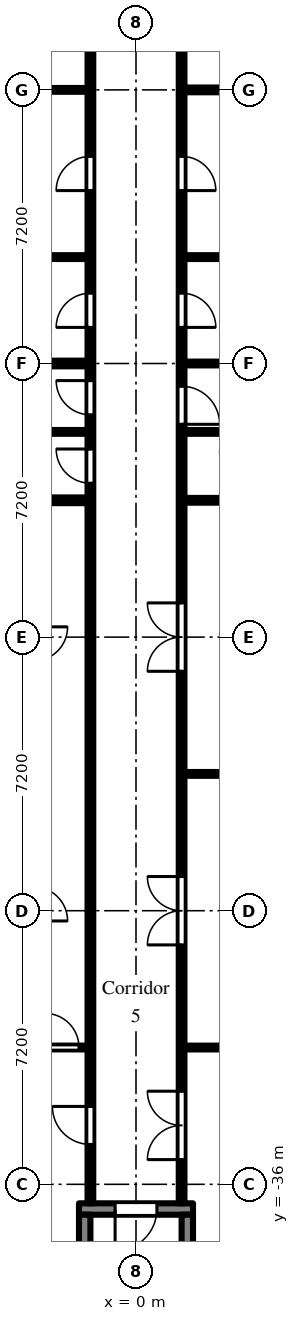
"""IFC4 building model, lengths in metres.
Left out: names, types, materials, properties, quantities, classifications, styles, units other than length and angle.
Written with IfcOpenShell. Run it as: python <this file> out.ifc"""

import sys

from ifc_helpers import new_model, si_unit, direction, frame, frame_2d, origin, place, context, subcontext, project, spatial, rectangle, extrude, element, fill, save


model = new_model("IFC4")
c1 = context("Model", 3, precision=1e-05, world=origin(), true_north=direction((0.0, 1.0)))
c2 = subcontext(c1, "Body", "Model", "MODEL_VIEW")
j1 = project(units=[si_unit("LENGTHUNIT", "METRE"), si_unit("PLANEANGLEUNIT", "RADIAN")], contexts=[c1])
p1 = place(None, origin())
s1 = spatial("IfcSite", under=j1, at=p1, CompositionType="ELEMENT")
p2 = place(p1, origin())
s2 = spatial("IfcBuilding", under=s1, at=p2, CompositionType="ELEMENT")
p3 = place(p2, frame((0.0, 0.0, 75.9)))
s3 = spatial("IfcBuildingStorey", under=s2, at=p3, CompositionType="ELEMENT", Elevation=75.9)
p4 = place(p3, frame((-1.5, -36.65, 0.0), z_axis=(0.0, 0.0, 1.0), x_axis=(1.0, 0.0, 0.0)))
e1 = element("IfcWall", 1, at=p4, inside=s3, PredefinedType="SHEAR", context=c2, shape_type="SweptSolid", body=[
    extrude(rectangle(XDim=3.0, YDim=0.3, at=frame_2d((1.5, 0.0))), origin(), (0.0, 0.0, 1.0), 2.575),
])
p5 = place(p4, frame((0.95, 0.0, 0.0)))
e2 = element("IfcOpeningElement", 2, at=p5, cuts=e1, PredefinedType="OPENING", context=c2, shape_type="SweptSolid", body=[
    extrude(rectangle(XDim=1.1, YDim=2.1, at=frame_2d((0.55, 1.05))), frame((0.0, 0.16, 0.0), z_axis=(0.0, -1.0, 0.0), x_axis=(1.0, 0.0, 0.0)), (0.0, 0.0, 1.0), 0.32),
])
for number, where, z_axis, x_axis in (
    (3, (-1.35, -36.8, 0.0), (0.0, 0.0, 1.0), (0.0, -1.0, 0.0)),
    (4, (1.35, -36.8, 0.0), (0.0, 0.0, 1.0), (0.0, -1.0, 0.0)),
):
    element("IfcWall", number, at=place(p3, frame(where, z_axis=z_axis, x_axis=x_axis)), inside=s3, PredefinedType="SHEAR", context=c2, shape_type="SweptSolid", body=[
        extrude(rectangle(XDim=5.8, YDim=0.3, at=frame_2d((2.9, 0.0))), origin(), (0.0, 0.0, 1.0), 2.575),
    ])
p6 = place(p3, frame((-6.9, -32.4, 0.0), z_axis=(0.0, 0.0, 1.0), x_axis=(1.0, 0.0, 0.0)))
e5 = element("IfcWall", 5, at=p6, inside=s3, PredefinedType="PARTITIONING", context=c2, shape_type="SweptSolid", body=[
    extrude(rectangle(XDim=5.625, YDim=0.1, at=frame_2d((2.812, 0.0))), origin(), (0.0, 0.0, 1.0), 2.575),
])
p7 = place(p6, frame((4.5, 0.0, 0.0)))
e6 = element("IfcOpeningElement", 6, at=p7, cuts=e5, PredefinedType="OPENING", context=c2, shape_type="SweptSolid", body=[
    extrude(rectangle(XDim=0.9, YDim=2.1, at=frame_2d((0.45, 1.05))), frame((0.0, 0.06, 0.0), z_axis=(0.0, -1.0, 0.0), x_axis=(1.0, 0.0, 0.0)), (0.0, 0.0, 1.0), 0.12),
])
p8 = place(p3, frame((-6.9, -18.0, 0.0), z_axis=(0.0, 0.0, 1.0), x_axis=(1.0, 0.0, 0.0)))
e7 = element("IfcWall", 7, at=p8, inside=s3, PredefinedType="PARTITIONING", context=c2, shape_type="SweptSolid", body=[
    extrude(rectangle(XDim=5.625, YDim=0.15, at=frame_2d((2.812, 0.0))), origin(), (0.0, 0.0, 1.0), 2.575),
])
p9 = place(p3, frame((-6.9, -16.2, 0.0), z_axis=(0.0, 0.0, 1.0), x_axis=(1.0, 0.0, 0.0)))
e8 = element("IfcWall", 8, at=p9, inside=s3, PredefinedType="PARTITIONING", context=c2, shape_type="SweptSolid", body=[
    extrude(rectangle(XDim=5.625, YDim=0.1, at=frame_2d((2.812, 0.0))), origin(), (0.0, 0.0, 1.0), 2.575),
])
p10 = place(p3, frame((-3.9, -14.4, 0.0), z_axis=(0.0, 0.0, 1.0), x_axis=(1.0, 0.0, 0.0)))
e9 = element("IfcWall", 9, at=p10, inside=s3, PredefinedType="PARTITIONING", context=c2, shape_type="SweptSolid", body=[
    extrude(rectangle(XDim=2.625, YDim=0.15, at=frame_2d((1.312, 0.0))), origin(), (0.0, 0.0, 1.0), 2.575),
])
for number, where, z_axis, x_axis in (
    (10, (-3.9, -11.6, 0.0), (0.0, 0.0, 1.0), (1.0, 0.0, 0.0)),
    (11, (-3.9, -7.2, 0.0), (0.0, 0.0, 1.0), (1.0, 0.0, 0.0)),
):
    element("IfcWall", number, at=place(p3, frame(where, z_axis=z_axis, x_axis=x_axis)), inside=s3, PredefinedType="PARTITIONING", context=c2, shape_type="SweptSolid", body=[
        extrude(rectangle(XDim=2.625, YDim=0.1, at=frame_2d((1.312, 0.0))), origin(), (0.0, 0.0, 1.0), 2.575),
    ])
p11 = place(p3, frame((-1.2, -36.5, 0.0), z_axis=(0.0, 0.0, 1.0), x_axis=(0.0, 1.0, 0.0)))
e12 = element("IfcWall", 12, at=p11, inside=s3, PredefinedType="PARTITIONING", context=c2, shape_type="SweptSolid", body=[
    extrude(rectangle(XDim=35.225, YDim=0.15, at=frame_2d((17.613, 0.0))), origin(), (0.0, 0.0, 1.0), 2.575),
])
p12 = place(p11, frame((23.05, 0.0, 0.0)))
e13 = element("IfcOpeningElement", 13, at=p12, cuts=e12, PredefinedType="OPENING", context=c2, shape_type="SweptSolid", body=[
    extrude(rectangle(XDim=0.9, YDim=2.1, at=frame_2d((0.45, 1.05))), frame((0.0, 0.085, 0.0), z_axis=(0.0, -1.0, 0.0), x_axis=(1.0, 0.0, 0.0)), (0.0, 0.0, 1.0), 0.17),
])
p13 = place(p11, frame((26.65, 0.0, 0.0)))
e14 = element("IfcOpeningElement", 14, at=p13, cuts=e12, PredefinedType="OPENING", context=c2, shape_type="SweptSolid", body=[
    extrude(rectangle(XDim=0.9, YDim=2.1, at=frame_2d((0.45, 1.05))), frame((0.0, 0.085, 0.0), z_axis=(0.0, -1.0, 0.0), x_axis=(1.0, 0.0, 0.0)), (0.0, 0.0, 1.0), 0.17),
])
p14 = place(p11, frame((20.75, 0.0, 0.0)))
e15 = element("IfcOpeningElement", 15, at=p14, cuts=e12, PredefinedType="OPENING", context=c2, shape_type="SweptSolid", body=[
    extrude(rectangle(XDim=0.9, YDim=2.1, at=frame_2d((0.45, 1.05))), frame((0.0, 0.085, 0.0), z_axis=(0.0, -1.0, 0.0), x_axis=(1.0, 0.0, 0.0)), (0.0, 0.0, 1.0), 0.17),
])
p15 = place(p11, frame((18.95, 0.0, 0.0)))
e16 = element("IfcOpeningElement", 16, at=p15, cuts=e12, PredefinedType="OPENING", context=c2, shape_type="SweptSolid", body=[
    extrude(rectangle(XDim=0.9, YDim=2.1, at=frame_2d((0.45, 1.05))), frame((0.0, 0.085, 0.0), z_axis=(0.0, -1.0, 0.0), x_axis=(1.0, 0.0, 0.0)), (0.0, 0.0, 1.0), 0.17),
])
p16 = place(p11, frame((1.55, 0.0, 0.0)))
e17 = element("IfcOpeningElement", 17, at=p16, cuts=e12, PredefinedType="OPENING", context=c2, shape_type="SweptSolid", body=[
    extrude(rectangle(XDim=1.0, YDim=2.1, at=frame_2d((0.5, 1.05))), frame((0.0, 0.085, 0.0), z_axis=(0.0, -1.0, 0.0), x_axis=(1.0, 0.0, 0.0)), (0.0, 0.0, 1.0), 0.17),
])
p17 = place(p3, frame((1.2, -36.5, 0.0), z_axis=(0.0, 0.0, 1.0), x_axis=(0.0, 1.0, 0.0)))
e18 = element("IfcWall", 18, at=p17, inside=s3, PredefinedType="PARTITIONING", context=c2, shape_type="SweptSolid", body=[
    extrude(rectangle(XDim=35.375, YDim=0.15, at=frame_2d((17.688, 0.0))), origin(), (0.0, 0.0, 1.0), 2.575),
])
p18 = place(p17, frame((33.65, 0.0, 0.0)))
e19 = element("IfcOpeningElement", 19, at=p18, cuts=e18, PredefinedType="OPENING", context=c2, shape_type="SweptSolid", body=[
    extrude(rectangle(XDim=0.9, YDim=2.1, at=frame_2d((0.45, 1.05))), frame((0.0, 0.085, 0.0), z_axis=(0.0, -1.0, 0.0), x_axis=(1.0, 0.0, 0.0)), (0.0, 0.0, 1.0), 0.17),
])
p19 = place(p17, frame((30.65, 0.0, 0.0)))
e20 = element("IfcOpeningElement", 20, at=p19, cuts=e18, PredefinedType="OPENING", context=c2, shape_type="SweptSolid", body=[
    extrude(rectangle(XDim=0.9, YDim=2.1, at=frame_2d((0.45, 1.05))), frame((0.0, 0.085, 0.0), z_axis=(0.0, -1.0, 0.0), x_axis=(1.0, 0.0, 0.0)), (0.0, 0.0, 1.0), 0.17),
])
p20 = place(p17, frame((23.05, 0.0, 0.0)))
e21 = element("IfcOpeningElement", 21, at=p20, cuts=e18, PredefinedType="OPENING", context=c2, shape_type="SweptSolid", body=[
    extrude(rectangle(XDim=0.9, YDim=2.1, at=frame_2d((0.45, 1.05))), frame((0.0, 0.085, 0.0), z_axis=(0.0, -1.0, 0.0), x_axis=(1.0, 0.0, 0.0)), (0.0, 0.0, 1.0), 0.17),
])
p21 = place(p17, frame((26.65, 0.0, 0.0)))
e22 = element("IfcOpeningElement", 22, at=p21, cuts=e18, PredefinedType="OPENING", context=c2, shape_type="SweptSolid", body=[
    extrude(rectangle(XDim=0.9, YDim=2.1, at=frame_2d((0.45, 1.05))), frame((0.0, 0.085, 0.0), z_axis=(0.0, -1.0, 0.0), x_axis=(1.0, 0.0, 0.0)), (0.0, 0.0, 1.0), 0.17),
])
p22 = place(p17, frame((20.5, 0.0, 0.0)))
e23 = element("IfcOpeningElement", 23, at=p22, cuts=e18, PredefinedType="OPENING", context=c2, shape_type="SweptSolid", body=[
    extrude(rectangle(XDim=1.0, YDim=2.1, at=frame_2d((0.5, 1.05))), frame((0.0, 0.085, 0.0), z_axis=(0.0, -1.0, 0.0), x_axis=(1.0, 0.0, 0.0)), (0.0, 0.0, 1.0), 0.17),
])
p23 = place(p17, frame((14.0, 0.0, 0.0)))
e24 = element("IfcOpeningElement", 24, at=p23, cuts=e18, PredefinedType="OPENING", context=c2, shape_type="SweptSolid", body=[
    extrude(rectangle(XDim=1.8, YDim=2.1, at=frame_2d((0.9, 1.05))), frame((0.0, 0.085, 0.0), z_axis=(0.0, -1.0, 0.0), x_axis=(1.0, 0.0, 0.0)), (0.0, 0.0, 1.0), 0.17),
])
p24 = place(p17, frame((6.8, 0.0, 0.0)))
e25 = element("IfcOpeningElement", 25, at=p24, cuts=e18, PredefinedType="OPENING", context=c2, shape_type="SweptSolid", body=[
    extrude(rectangle(XDim=1.8, YDim=2.1, at=frame_2d((0.9, 1.05))), frame((0.0, 0.085, 0.0), z_axis=(0.0, -1.0, 0.0), x_axis=(1.0, 0.0, 0.0)), (0.0, 0.0, 1.0), 0.17),
])
p25 = place(p17, frame((1.15, 0.0, 0.0)))
e26 = element("IfcOpeningElement", 26, at=p25, cuts=e18, PredefinedType="OPENING", context=c2, shape_type="SweptSolid", body=[
    extrude(rectangle(XDim=1.8, YDim=2.1, at=frame_2d((0.9, 1.05))), frame((0.0, 0.085, 0.0), z_axis=(0.0, -1.0, 0.0), x_axis=(1.0, 0.0, 0.0)), (0.0, 0.0, 1.0), 0.17),
])
for number, where, z_axis, x_axis in (
    (27, (1.275, -32.4, 0.0), (0.0, 0.0, 1.0), (1.0, 0.0, 0.0)),
    (28, (1.275, -25.2, 0.0), (0.0, 0.0, 1.0), (1.0, 0.0, 0.0)),
):
    element("IfcWall", number, at=place(p3, frame(where, z_axis=z_axis, x_axis=x_axis)), inside=s3, PredefinedType="PARTITIONING", context=c2, shape_type="SweptSolid", body=[
        extrude(rectangle(XDim=5.625, YDim=0.1, at=frame_2d((2.812, 0.0))), origin(), (0.0, 0.0, 1.0), 2.575),
    ])
p26 = place(p3, frame((1.275, -18.0, 0.0), z_axis=(0.0, 0.0, 1.0), x_axis=(1.0, 0.0, 0.0)))
e29 = element("IfcWall", 29, at=p26, inside=s3, PredefinedType="PARTITIONING", context=c2, shape_type="SweptSolid", body=[
    extrude(rectangle(XDim=1.725, YDim=0.125, at=frame_2d((0.863, 0.0))), origin(), (0.0, 0.0, 1.0), 2.575),
])
p27 = place(p3, frame((1.275, -16.2, 0.0), z_axis=(0.0, 0.0, 1.0), x_axis=(1.0, 0.0, 0.0)))
e30 = element("IfcWall", 30, at=p27, inside=s3, PredefinedType="PARTITIONING", context=c2, shape_type="SweptSolid", body=[
    extrude(rectangle(XDim=1.775, YDim=0.1, at=frame_2d((0.888, 0.0))), origin(), (0.0, 0.0, 1.0), 2.575),
])
for number, where, z_axis, x_axis in (
    (31, (1.275, -14.4, 0.0), (0.0, 0.0, 1.0), (1.0, 0.0, 0.0)),
    (32, (1.275, -11.6, 0.0), (0.0, 0.0, 1.0), (1.0, 0.0, 0.0)),
):
    element("IfcWall", number, at=place(p3, frame(where, z_axis=z_axis, x_axis=x_axis)), inside=s3, PredefinedType="PARTITIONING", context=c2, shape_type="SweptSolid", body=[
        extrude(rectangle(XDim=2.625, YDim=0.1, at=frame_2d((1.312, 0.0))), origin(), (0.0, 0.0, 1.0), 2.575),
    ])
p28 = place(p3, frame((1.275, -7.2, 0.0), z_axis=(0.0, 0.0, 1.0), x_axis=(1.0, 0.0, 0.0)))
e33 = element("IfcWall", 33, at=p28, inside=s3, PredefinedType="PARTITIONING", context=c2, shape_type="SweptSolid", body=[
    extrude(rectangle(XDim=2.625, YDim=0.125, at=frame_2d((1.312, 0.0))), origin(), (0.0, 0.0, 1.0), 2.575),
])
p29 = place(p5, frame((1.1, 0.0, 0.0), z_axis=(0.0, 0.0, 1.0), x_axis=(-1.0, 0.0, 0.0)))
e34 = element("IfcDoor", 34, at=p29, inside=s3, OperationType="SINGLE_SWING_RIGHT", PredefinedType="DOOR", context=c2, shape_type="SweptSolid", body=[
    extrude(rectangle(XDim=1.1, YDim=2.1, at=frame_2d((0.55, 1.05))), frame((0.0, 0.025, 0.0), z_axis=(0.0, -1.0, 0.0), x_axis=(1.0, 0.0, 0.0)), (0.0, 0.0, 1.0), 0.05),
])
fill(e2, e34)
p30 = place(p20, frame((0.9, 0.0, 0.0), z_axis=(0.0, 0.0, 1.0), x_axis=(-1.0, 0.0, 0.0)))
e35 = element("IfcDoor", 35, at=p30, inside=s3, OperationType="SINGLE_SWING_RIGHT", PredefinedType="DOOR", context=c2, shape_type="SweptSolid", body=[
    extrude(rectangle(XDim=0.9, YDim=2.1, at=frame_2d((0.45, 1.05))), frame((0.0, 0.025, 0.0), z_axis=(0.0, -1.0, 0.0), x_axis=(1.0, 0.0, 0.0)), (0.0, 0.0, 1.0), 0.05),
])
fill(e21, e35)
p31 = place(p21, frame((0.9, 0.0, 0.0), z_axis=(0.0, 0.0, 1.0), x_axis=(-1.0, 0.0, 0.0)))
e36 = element("IfcDoor", 36, at=p31, inside=s3, OperationType="SINGLE_SWING_RIGHT", PredefinedType="DOOR", context=c2, shape_type="SweptSolid", body=[
    extrude(rectangle(XDim=0.9, YDim=2.1, at=frame_2d((0.45, 1.05))), frame((0.0, 0.025, 0.0), z_axis=(0.0, -1.0, 0.0), x_axis=(1.0, 0.0, 0.0)), (0.0, 0.0, 1.0), 0.05),
])
fill(e22, e36)
p32 = place(p22, frame((1.0, 0.0, 0.0), z_axis=(0.0, 0.0, 1.0), x_axis=(-1.0, 0.0, 0.0)))
e37 = element("IfcDoor", 37, at=p32, inside=s3, OperationType="SINGLE_SWING_RIGHT", PredefinedType="DOOR", context=c2, shape_type="SweptSolid", body=[
    extrude(rectangle(XDim=1.0, YDim=2.1, at=frame_2d((0.5, 1.05))), frame((0.0, 0.025, 0.0), z_axis=(0.0, -1.0, 0.0), x_axis=(1.0, 0.0, 0.0)), (0.0, 0.0, 1.0), 0.05),
])
fill(e23, e37)
p33 = place(p23, origin())
e38 = element("IfcDoor", 38, at=p33, inside=s3, OperationType="DOUBLE_DOOR_DOUBLE_SWING", PredefinedType="DOOR", context=c2, shape_type="SweptSolid", body=[
    extrude(rectangle(XDim=1.8, YDim=2.1, at=frame_2d((0.9, 1.05))), frame((0.0, 0.025, 0.0), z_axis=(0.0, -1.0, 0.0), x_axis=(1.0, 0.0, 0.0)), (0.0, 0.0, 1.0), 0.05),
])
fill(e24, e38)
p34 = place(p24, origin())
e39 = element("IfcDoor", 39, at=p34, inside=s3, OperationType="DOUBLE_DOOR_DOUBLE_SWING", PredefinedType="DOOR", context=c2, shape_type="SweptSolid", body=[
    extrude(rectangle(XDim=1.8, YDim=2.1, at=frame_2d((0.9, 1.05))), frame((0.0, 0.025, 0.0), z_axis=(0.0, -1.0, 0.0), x_axis=(1.0, 0.0, 0.0)), (0.0, 0.0, 1.0), 0.05),
])
fill(e25, e39)
p35 = place(p25, origin())
e40 = element("IfcDoor", 40, at=p35, inside=s3, OperationType="DOUBLE_DOOR_DOUBLE_SWING", PredefinedType="DOOR", context=c2, shape_type="SweptSolid", body=[
    extrude(rectangle(XDim=1.8, YDim=2.1, at=frame_2d((0.9, 1.05))), frame((0.0, 0.025, 0.0), z_axis=(0.0, -1.0, 0.0), x_axis=(1.0, 0.0, 0.0)), (0.0, 0.0, 1.0), 0.05),
])
fill(e26, e40)
p36 = place(p12, origin())
e41 = element("IfcDoor", 41, at=p36, inside=s3, OperationType="SINGLE_SWING_LEFT", PredefinedType="DOOR", context=c2, shape_type="SweptSolid", body=[
    extrude(rectangle(XDim=0.9, YDim=2.1, at=frame_2d((0.45, 1.05))), frame((0.0, 0.025, 0.0), z_axis=(0.0, -1.0, 0.0), x_axis=(1.0, 0.0, 0.0)), (0.0, 0.0, 1.0), 0.05),
])
fill(e13, e41)
p37 = place(p13, origin())
e42 = element("IfcDoor", 42, at=p37, inside=s3, OperationType="SINGLE_SWING_LEFT", PredefinedType="DOOR", context=c2, shape_type="SweptSolid", body=[
    extrude(rectangle(XDim=0.9, YDim=2.1, at=frame_2d((0.45, 1.05))), frame((0.0, 0.025, 0.0), z_axis=(0.0, -1.0, 0.0), x_axis=(1.0, 0.0, 0.0)), (0.0, 0.0, 1.0), 0.05),
])
fill(e14, e42)
p38 = place(p14, origin())
e43 = element("IfcDoor", 43, at=p38, inside=s3, OperationType="SINGLE_SWING_RIGHT", PredefinedType="DOOR", context=c2, shape_type="SweptSolid", body=[
    extrude(rectangle(XDim=0.9, YDim=2.1, at=frame_2d((0.45, 1.05))), frame((0.0, 0.025, 0.0), z_axis=(0.0, -1.0, 0.0), x_axis=(1.0, 0.0, 0.0)), (0.0, 0.0, 1.0), 0.05),
])
fill(e15, e43)
p39 = place(p15, origin())
e44 = element("IfcDoor", 44, at=p39, inside=s3, OperationType="SINGLE_SWING_RIGHT", PredefinedType="DOOR", context=c2, shape_type="SweptSolid", body=[
    extrude(rectangle(XDim=0.9, YDim=2.1, at=frame_2d((0.45, 1.05))), frame((0.0, 0.025, 0.0), z_axis=(0.0, -1.0, 0.0), x_axis=(1.0, 0.0, 0.0)), (0.0, 0.0, 1.0), 0.05),
])
fill(e16, e44)
p40 = place(p16, origin())
e45 = element("IfcDoor", 45, at=p40, inside=s3, OperationType="SINGLE_SWING_RIGHT", PredefinedType="DOOR", context=c2, shape_type="SweptSolid", body=[
    extrude(rectangle(XDim=1.0, YDim=2.1, at=frame_2d((0.5, 1.05))), frame((0.0, 0.025, 0.0), z_axis=(0.0, -1.0, 0.0), x_axis=(1.0, 0.0, 0.0)), (0.0, 0.0, 1.0), 0.05),
])
fill(e17, e45)
p41 = place(p7, origin())
e46 = element("IfcDoor", 46, at=p41, inside=s3, OperationType="SINGLE_SWING_LEFT", PredefinedType="DOOR", context=c2, shape_type="SweptSolid", body=[
    extrude(rectangle(XDim=0.9, YDim=2.1, at=frame_2d((0.45, 1.05))), frame((0.0, 0.025, 0.0), z_axis=(0.0, -1.0, 0.0), x_axis=(1.0, 0.0, 0.0)), (0.0, 0.0, 1.0), 0.05),
])
fill(e6, e46)
save(model, sys.argv[1])
